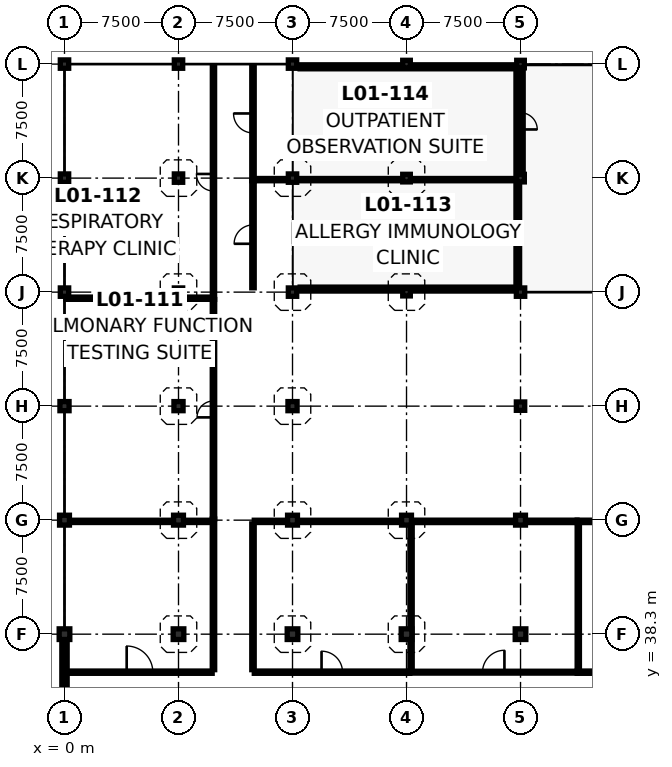
"""IFC4 building model, lengths in metres.
Left out: names, types, materials, properties, quantities, classifications, styles, units other than length and angle.
Written with IfcOpenShell. Run it as: python <this file> out.ifc"""

import sys

from ifc_helpers import new_model, si_unit, direction, frame, frame_2d, origin, origin_2d, place, context, subcontext, project, spatial, rectangle, extrude, element, fill, save


model = new_model("IFC4")
c1 = context("Model", 3, precision=1e-05, world=origin(), true_north=direction((0.0, 1.0)))
c2 = subcontext(c1, "Body", "Model", "MODEL_VIEW")
j1 = project(units=[si_unit("LENGTHUNIT", "METRE"), si_unit("PLANEANGLEUNIT", "RADIAN")], contexts=[c1])
p1 = place(None, origin())
s1 = spatial("IfcSite", under=j1, at=p1, CompositionType="ELEMENT")
p2 = place(p1, origin())
s2 = spatial("IfcBuilding", under=s1, at=p2, CompositionType="ELEMENT")
p3 = place(p2, frame((0.0, 0.0, 5.0)))
s3 = spatial("IfcBuildingStorey", under=s2, at=p3, CompositionType="ELEMENT", Elevation=5.0)
p4 = place(p3, frame((0.0, 38.3, 0.0), z_axis=(0.0, 0.0, 1.0), x_axis=(1.0, 0.0, 0.0)))
e1 = element("IfcColumn", 1, at=p4, inside=s3, PredefinedType="COLUMN", context=c2, shape_type="SweptSolid", body=[
    extrude(rectangle(XDim=0.7, YDim=0.7, at=origin_2d()), origin(), (0.0, 0.0, 1.0), 4.2),
])
p5 = place(p3, frame((0.0, 45.8, 0.0), z_axis=(0.0, 0.0, 1.0), x_axis=(1.0, 0.0, 0.0)))
e2 = element("IfcColumn", 2, at=p5, inside=s3, PredefinedType="COLUMN", context=c2, shape_type="SweptSolid", body=[
    extrude(rectangle(XDim=0.65, YDim=0.65, at=origin_2d()), origin(), (0.0, 0.0, 1.0), 4.2),
])
p6 = place(p3, frame((0.0, 53.3, 0.0), z_axis=(0.0, 0.0, 1.0), x_axis=(1.0, 0.0, 0.0)))
e3 = element("IfcColumn", 3, at=p6, inside=s3, PredefinedType="COLUMN", context=c2, shape_type="SweptSolid", body=[
    extrude(rectangle(XDim=0.6, YDim=0.6, at=origin_2d()), origin(), (0.0, 0.0, 1.0), 4.2),
])
p7 = place(p3, frame((0.0, 60.8, 0.0), z_axis=(0.0, 0.0, 1.0), x_axis=(1.0, 0.0, 0.0)))
e4 = element("IfcColumn", 4, at=p7, inside=s3, PredefinedType="COLUMN", context=c2, shape_type="SweptSolid", body=[
    extrude(rectangle(XDim=0.55, YDim=0.55, at=origin_2d()), origin(), (0.0, 0.0, 1.0), 4.2),
])
for number, where, z_axis, x_axis in (
    (5, (0.0, 68.3, 0.0), (0.0, 0.0, 1.0), (1.0, 0.0, 0.0)),
    (6, (0.0, 75.8, 0.0), (0.0, 0.0, 1.0), (1.0, 0.0, 0.0)),
):
    element("IfcColumn", number, at=place(p3, frame(where, z_axis=z_axis, x_axis=x_axis)), inside=s3, PredefinedType="COLUMN", context=c2, shape_type="SweptSolid", body=[
        extrude(rectangle(XDim=0.55, YDim=0.55, at=origin_2d()), origin(), (0.0, 0.0, 1.0), 4.25),
    ])
p8 = place(p3, frame((7.5, 38.3, 0.0), z_axis=(0.0, 0.0, 1.0), x_axis=(1.0, 0.0, 0.0)))
e7 = element("IfcColumn", 7, at=p8, inside=s3, PredefinedType="COLUMN", context=c2, shape_type="SweptSolid", body=[
    extrude(rectangle(XDim=0.7, YDim=0.7, at=origin_2d()), origin(), (0.0, 0.0, 1.0), 4.2),
])
p9 = place(p3, frame((7.5, 45.8, 0.0), z_axis=(0.0, 0.0, 1.0), x_axis=(1.0, 0.0, 0.0)))
e8 = element("IfcColumn", 8, at=p9, inside=s3, PredefinedType="COLUMN", context=c2, shape_type="SweptSolid", body=[
    extrude(rectangle(XDim=0.65, YDim=0.65, at=origin_2d()), origin(), (0.0, 0.0, 1.0), 4.2),
])
p10 = place(p3, frame((7.5, 53.3, 0.0), z_axis=(0.0, 0.0, 1.0), x_axis=(1.0, 0.0, 0.0)))
e9 = element("IfcColumn", 9, at=p10, inside=s3, PredefinedType="COLUMN", context=c2, shape_type="SweptSolid", body=[
    extrude(rectangle(XDim=0.6, YDim=0.6, at=origin_2d()), origin(), (0.0, 0.0, 1.0), 4.2),
])
p11 = place(p3, frame((7.5, 60.8, 0.0), z_axis=(0.0, 0.0, 1.0), x_axis=(1.0, 0.0, 0.0)))
e10 = element("IfcColumn", 10, at=p11, inside=s3, PredefinedType="COLUMN", context=c2, shape_type="SweptSolid", body=[
    extrude(rectangle(XDim=0.55, YDim=0.55, at=origin_2d()), origin(), (0.0, 0.0, 1.0), 4.2),
])
for number, where, z_axis, x_axis in (
    (11, (7.5, 68.3, 0.0), (0.0, 0.0, 1.0), (1.0, 0.0, 0.0)),
    (12, (7.5, 75.8, 0.0), (0.0, 0.0, 1.0), (1.0, 0.0, 0.0)),
):
    element("IfcColumn", number, at=place(p3, frame(where, z_axis=z_axis, x_axis=x_axis)), inside=s3, PredefinedType="COLUMN", context=c2, shape_type="SweptSolid", body=[
        extrude(rectangle(XDim=0.55, YDim=0.55, at=origin_2d()), origin(), (0.0, 0.0, 1.0), 4.25),
    ])
p12 = place(p3, frame((15.0, 38.3, 0.0), z_axis=(0.0, 0.0, 1.0), x_axis=(1.0, 0.0, 0.0)))
e13 = element("IfcColumn", 13, at=p12, inside=s3, PredefinedType="COLUMN", context=c2, shape_type="SweptSolid", body=[
    extrude(rectangle(XDim=0.7, YDim=0.7, at=origin_2d()), origin(), (0.0, 0.0, 1.0), 4.2),
])
p13 = place(p3, frame((15.0, 45.8, 0.0), z_axis=(0.0, 0.0, 1.0), x_axis=(1.0, 0.0, 0.0)))
e14 = element("IfcColumn", 14, at=p13, inside=s3, PredefinedType="COLUMN", context=c2, shape_type="SweptSolid", body=[
    extrude(rectangle(XDim=0.65, YDim=0.65, at=origin_2d()), origin(), (0.0, 0.0, 1.0), 4.2),
])
p14 = place(p3, frame((15.0, 53.3, 0.0), z_axis=(0.0, 0.0, 1.0), x_axis=(1.0, 0.0, 0.0)))
e15 = element("IfcColumn", 15, at=p14, inside=s3, PredefinedType="COLUMN", context=c2, shape_type="SweptSolid", body=[
    extrude(rectangle(XDim=0.6, YDim=0.6, at=origin_2d()), origin(), (0.0, 0.0, 1.0), 4.2),
])
p15 = place(p3, frame((15.0, 60.8, 0.0), z_axis=(0.0, 0.0, 1.0), x_axis=(1.0, 0.0, 0.0)))
e16 = element("IfcColumn", 16, at=p15, inside=s3, PredefinedType="COLUMN", context=c2, shape_type="SweptSolid", body=[
    extrude(rectangle(XDim=0.55, YDim=0.55, at=origin_2d()), origin(), (0.0, 0.0, 1.0), 4.2),
])
for number, where, z_axis, x_axis in (
    (17, (15.0, 68.3, 0.0), (0.0, 0.0, 1.0), (1.0, 0.0, 0.0)),
    (18, (15.0, 75.8, 0.0), (0.0, 0.0, 1.0), (1.0, 0.0, 0.0)),
):
    element("IfcColumn", number, at=place(p3, frame(where, z_axis=z_axis, x_axis=x_axis)), inside=s3, PredefinedType="COLUMN", context=c2, shape_type="SweptSolid", body=[
        extrude(rectangle(XDim=0.55, YDim=0.55, at=origin_2d()), origin(), (0.0, 0.0, 1.0), 4.25),
    ])
p16 = place(p3, frame((22.5, 38.3, 0.0), z_axis=(0.0, 0.0, 1.0), x_axis=(1.0, 0.0, 0.0)))
e19 = element("IfcColumn", 19, at=p16, inside=s3, PredefinedType="COLUMN", context=c2, shape_type="SweptSolid", body=[
    extrude(rectangle(XDim=0.7, YDim=0.7, at=origin_2d()), origin(), (0.0, 0.0, 1.0), 4.2),
])
p17 = place(p3, frame((22.5, 45.8, 0.0), z_axis=(0.0, 0.0, 1.0), x_axis=(1.0, 0.0, 0.0)))
e20 = element("IfcColumn", 20, at=p17, inside=s3, PredefinedType="COLUMN", context=c2, shape_type="SweptSolid", body=[
    extrude(rectangle(XDim=0.65, YDim=0.65, at=origin_2d()), origin(), (0.0, 0.0, 1.0), 4.2),
])
for number, where, z_axis, x_axis in (
    (21, (22.5, 60.8, 0.0), (0.0, 0.0, 1.0), (1.0, 0.0, 0.0)),
    (22, (22.5, 68.3, 0.0), (0.0, 0.0, 1.0), (1.0, 0.0, 0.0)),
    (23, (22.5, 75.8, 0.0), (0.0, 0.0, 1.0), (1.0, 0.0, 0.0)),
):
    element("IfcColumn", number, at=place(p3, frame(where, z_axis=z_axis, x_axis=x_axis)), inside=s3, PredefinedType="COLUMN", context=c2, shape_type="SweptSolid", body=[
        extrude(rectangle(XDim=0.5, YDim=0.5, at=origin_2d()), origin(), (0.0, 0.0, 1.0), 4.2),
    ])
p18 = place(p3, frame((30.0, 38.3, 0.0), z_axis=(0.0, 0.0, 1.0), x_axis=(1.0, 0.0, 0.0)))
e24 = element("IfcColumn", 24, at=p18, inside=s3, PredefinedType="COLUMN", context=c2, shape_type="SweptSolid", body=[
    extrude(rectangle(XDim=0.7, YDim=0.7, at=origin_2d()), origin(), (0.0, 0.0, 1.0), 4.2),
])
p19 = place(p3, frame((30.0, 45.8, 0.0), z_axis=(0.0, 0.0, 1.0), x_axis=(1.0, 0.0, 0.0)))
e25 = element("IfcColumn", 25, at=p19, inside=s3, PredefinedType="COLUMN", context=c2, shape_type="SweptSolid", body=[
    extrude(rectangle(XDim=0.65, YDim=0.65, at=origin_2d()), origin(), (0.0, 0.0, 1.0), 4.2),
])
for number, where, z_axis, x_axis in (
    (26, (30.0, 53.3, 0.0), (0.0, 0.0, 1.0), (1.0, 0.0, 0.0)),
    (27, (30.0, 60.8, 0.0), (0.0, 0.0, 1.0), (1.0, 0.0, 0.0)),
):
    element("IfcColumn", number, at=place(p3, frame(where, z_axis=z_axis, x_axis=x_axis)), inside=s3, PredefinedType="COLUMN", context=c2, shape_type="SweptSolid", body=[
        extrude(rectangle(XDim=0.55, YDim=0.55, at=origin_2d()), origin(), (0.0, 0.0, 1.0), 4.2),
    ])
for number, where, z_axis, x_axis in (
    (28, (30.0, 68.3, 0.0), (0.0, 0.0, 1.0), (1.0, 0.0, 0.0)),
    (29, (30.0, 75.8, 0.0), (0.0, 0.0, 1.0), (1.0, 0.0, 0.0)),
):
    element("IfcColumn", number, at=place(p3, frame(where, z_axis=z_axis, x_axis=x_axis)), inside=s3, PredefinedType="COLUMN", context=c2, shape_type="SweptSolid", body=[
        extrude(rectangle(XDim=0.5, YDim=0.5, at=origin_2d()), origin(), (0.0, 0.0, 1.0), 4.2),
    ])
p20 = place(p3, frame((0.0, 31.15, 0.0), z_axis=(0.0, 0.0, 1.0), x_axis=(0.0, 1.0, 0.0)))
e30 = element("IfcWall", 30, at=p20, inside=s3, PredefinedType="SOLIDWALL", context=c2, shape_type="SweptSolid", body=[
    extrude(rectangle(XDim=6.8, YDim=0.35, at=frame_2d((3.4, 0.0))), origin(), (0.0, 0.0, 1.0), 3.535),
])
p21 = place(p3, frame((30.0, 75.55, 0.0), z_axis=(0.0, 0.0, 1.0), x_axis=(0.0, -1.0, 0.0)))
e31 = element("IfcWall", 31, at=p21, inside=s3, PredefinedType="SOLIDWALL", context=c2, shape_type="SweptSolid", body=[
    extrude(rectangle(XDim=7.0, YDim=0.35, at=frame_2d((3.5, 0.0))), origin(), (0.0, 0.0, 1.0), 4.2),
])
p22 = place(p21, frame((2.95, 0.0, 0.0)))
e32 = element("IfcOpeningElement", 32, at=p22, cuts=e31, PredefinedType="OPENING", context=c2, shape_type="SweptSolid", body=[
    extrude(rectangle(XDim=1.1, YDim=2.15, at=frame_2d((0.55, 1.075))), frame((0.0, 0.187, 0.0), z_axis=(0.0, -1.0, 0.0), x_axis=(1.0, 0.0, 0.0)), (0.0, 0.0, 1.0), 0.374),
])
p23 = place(p3, frame((15.5, 75.62, 4.4), z_axis=(0.0, 0.0, 1.0), x_axis=(1.0, 0.0, 0.0)))
e33 = element("IfcWall", 33, at=p23, inside=s3, PredefinedType="PARAPET", context=c2, shape_type="SweptSolid", body=[
    extrude(rectangle(XDim=14.02, YDim=0.26, at=frame_2d((7.01, 0.0))), origin(), (0.0, 0.0, 1.0), 0.6),
])
p24 = place(p3, frame((29.82, 75.32, 4.4), z_axis=(0.0, 0.0, 1.0), x_axis=(0.0, -1.0, 0.0)))
e34 = element("IfcWall", 34, at=p24, inside=s3, PredefinedType="PARAPET", context=c2, shape_type="SweptSolid", body=[
    extrude(rectangle(XDim=14.02, YDim=0.24, at=frame_2d((7.01, 0.0))), origin(), (0.0, 0.0, 1.0), 0.6),
])
p25 = place(p3, frame((29.52, 61.0, 4.4), z_axis=(0.0, 0.0, 1.0), x_axis=(-1.0, 0.0, 0.0)))
e35 = element("IfcWall", 35, at=p25, inside=s3, PredefinedType="PARAPET", context=c2, shape_type="SweptSolid", body=[
    extrude(rectangle(XDim=14.02, YDim=0.26, at=frame_2d((7.01, 0.0))), origin(), (0.0, 0.0, 1.0), 0.6),
])
p26 = place(p3, frame((0.187, 35.8, 0.0), z_axis=(0.0, 0.0, 1.0), x_axis=(1.0, 0.0, 0.0)))
e36 = element("IfcWall", 36, at=p26, inside=s3, PredefinedType="PARTITIONING", context=c2, shape_type="SweptSolid", body=[
    extrude(rectangle(XDim=9.528, YDim=0.15, at=frame_2d((4.764, 0.0))), origin(), (0.0, 0.0, 1.0), 3.265),
])
p27 = place(p26, frame((3.904, 0.0, 0.0)))
e37 = element("IfcOpeningElement", 37, at=p27, cuts=e36, PredefinedType="OPENING", context=c2, shape_type="SweptSolid", body=[
    extrude(rectangle(XDim=1.72, YDim=2.34, at=frame_2d((0.86, 1.17))), frame((0.0, 0.087, 0.0), z_axis=(0.0, -1.0, 0.0), x_axis=(1.0, 0.0, 0.0)), (0.0, 0.0, 1.0), 0.174),
])
p28 = place(p3, frame((12.485, 35.8, 0.0), z_axis=(0.0, 0.0, 1.0), x_axis=(1.0, 0.0, 0.0)))
e38 = element("IfcWall", 38, at=p28, inside=s3, PredefinedType="PARTITIONING", context=c2, shape_type="SweptSolid", body=[
    extrude(rectangle(XDim=10.23, YDim=0.15, at=frame_2d((5.115, 0.0))), origin(), (0.0, 0.0, 1.0), 3.265),
])
p29 = place(p28, frame((4.425, 0.0, 0.0)))
e39 = element("IfcOpeningElement", 39, at=p29, cuts=e38, PredefinedType="OPENING", context=c2, shape_type="SweptSolid", body=[
    extrude(rectangle(XDim=1.38, YDim=2.3, at=frame_2d((0.69, 1.15))), frame((0.0, 0.087, 0.0), z_axis=(0.0, -1.0, 0.0), x_axis=(1.0, 0.0, 0.0)), (0.0, 0.0, 1.0), 0.174),
])
p30 = place(p3, frame((22.727, 35.8, 0.0), z_axis=(0.0, 0.0, 1.0), x_axis=(1.0, 0.0, 0.0)))
e40 = element("IfcWall", 40, at=p30, inside=s3, PredefinedType="PARTITIONING", context=c2, shape_type="SweptSolid", body=[
    extrude(rectangle(XDim=10.988, YDim=0.125, at=frame_2d((5.494, 0.0))), origin(), (0.0, 0.0, 1.0), 3.265),
])
p31 = place(p30, frame((4.774, 0.0, 0.0)))
e41 = element("IfcOpeningElement", 41, at=p31, cuts=e40, PredefinedType="OPENING", context=c2, shape_type="SweptSolid", body=[
    extrude(rectangle(XDim=1.44, YDim=2.32, at=frame_2d((0.72, 1.16))), frame((0.0, 0.074, 0.0), z_axis=(0.0, -1.0, 0.0), x_axis=(1.0, 0.0, 0.0)), (0.0, 0.0, 1.0), 0.149),
])
p32 = place(p3, frame((33.727, 35.8, 0.0), z_axis=(0.0, 0.0, 1.0), x_axis=(1.0, 0.0, 0.0)))
e42 = element("IfcWall", 42, at=p32, inside=s3, PredefinedType="PARTITIONING", context=c2, shape_type="SweptSolid", body=[
    extrude(rectangle(XDim=11.171, YDim=0.15, at=frame_2d((5.585, 0.0))), origin(), (0.0, 0.0, 1.0), 3.485),
])
p33 = place(p32, frame((5.085, 0.0, 0.0)))
e43 = element("IfcOpeningElement", 43, at=p33, cuts=e42, PredefinedType="OPENING", context=c2, shape_type="SweptSolid", body=[
    extrude(rectangle(XDim=1.0, YDim=2.15, at=frame_2d((0.5, 1.075))), frame((0.0, 0.087, 0.0), z_axis=(0.0, -1.0, 0.0), x_axis=(1.0, 0.0, 0.0)), (0.0, 0.0, 1.0), 0.174),
])
p34 = place(p3, frame((9.8, 45.885, 0.0), z_axis=(0.0, 0.0, 1.0), x_axis=(0.0, 1.0, 0.0)))
e44 = element("IfcWall", 44, at=p34, inside=s3, PredefinedType="PARTITIONING", context=c2, shape_type="SweptSolid", body=[
    extrude(rectangle(XDim=14.43, YDim=0.16, at=frame_2d((7.215, 0.0))), origin(), (0.0, 0.0, 1.0), 3.265),
])
p35 = place(p34, frame((6.675, 0.0, 0.0)))
e45 = element("IfcOpeningElement", 45, at=p35, cuts=e44, PredefinedType="OPENING", context=c2, shape_type="SweptSolid", body=[
    extrude(rectangle(XDim=1.08, YDim=2.18, at=frame_2d((0.54, 1.09))), frame((0.0, 0.092, 0.0), z_axis=(0.0, -1.0, 0.0), x_axis=(1.0, 0.0, 0.0)), (0.0, 0.0, 1.0), 0.184),
])
p36 = place(p3, frame((9.8, 60.327, 0.0), z_axis=(0.0, 0.0, 1.0), x_axis=(0.0, 1.0, 0.0)))
e46 = element("IfcWall", 46, at=p36, inside=s3, PredefinedType="PARTITIONING", context=c2, shape_type="SweptSolid", body=[
    extrude(rectangle(XDim=15.371, YDim=0.15, at=frame_2d((7.686, 0.0))), origin(), (0.0, 0.0, 1.0), 3.265),
])
p37 = place(p36, frame((7.125, 0.0, 0.0)))
e47 = element("IfcOpeningElement", 47, at=p37, cuts=e46, PredefinedType="OPENING", context=c2, shape_type="SweptSolid", body=[
    extrude(rectangle(XDim=1.12, YDim=2.2, at=frame_2d((0.56, 1.1))), frame((0.0, 0.087, 0.0), z_axis=(0.0, -1.0, 0.0), x_axis=(1.0, 0.0, 0.0)), (0.0, 0.0, 1.0), 0.174),
])
p38 = place(p3, frame((12.4, 61.085, 0.0), z_axis=(0.0, 0.0, 1.0), x_axis=(0.0, 1.0, 0.0)))
e48 = element("IfcWall", 48, at=p38, inside=s3, PredefinedType="PARTITIONING", context=c2, shape_type="SweptSolid", body=[
    extrude(rectangle(XDim=7.03, YDim=0.16, at=frame_2d((3.515, 0.0))), origin(), (0.0, 0.0, 1.0), 3.265),
])
p39 = place(p38, frame((2.895, 0.0, 0.0)))
e49 = element("IfcOpeningElement", 49, at=p39, cuts=e48, PredefinedType="OPENING", context=c2, shape_type="SweptSolid", body=[
    extrude(rectangle(XDim=1.24, YDim=2.2, at=frame_2d((0.62, 1.1))), frame((0.0, 0.092, 0.0), z_axis=(0.0, -1.0, 0.0), x_axis=(1.0, 0.0, 0.0)), (0.0, 0.0, 1.0), 0.184),
])
p40 = place(p3, frame((12.4, 68.127, 0.0), z_axis=(0.0, 0.0, 1.0), x_axis=(0.0, 1.0, 0.0)))
e50 = element("IfcWall", 50, at=p40, inside=s3, PredefinedType="PARTITIONING", context=c2, shape_type="SweptSolid", body=[
    extrude(rectangle(XDim=7.571, YDim=0.16, at=frame_2d((3.786, 0.0))), origin(), (0.0, 0.0, 1.0), 3.315),
])
p41 = place(p40, frame((3.146, 0.0, 0.0)))
e51 = element("IfcOpeningElement", 51, at=p41, cuts=e50, PredefinedType="OPENING", context=c2, shape_type="SweptSolid", body=[
    extrude(rectangle(XDim=1.28, YDim=2.22, at=frame_2d((0.64, 1.11))), frame((0.0, 0.092, 0.0), z_axis=(0.0, -1.0, 0.0), x_axis=(1.0, 0.0, 0.0)), (0.0, 0.0, 1.0), 0.184),
])
p42 = place(p3, frame((0.332, 45.72, 0.0), z_axis=(0.0, 0.0, 1.0), x_axis=(1.0, 0.0, 0.0)))
e52 = element("IfcWall", 52, at=p42, inside=s3, PredefinedType="PARTITIONING", context=c2, shape_type="SweptSolid", body=[
    extrude(rectangle(XDim=9.383, YDim=0.15, at=frame_2d((4.691, 0.0))), origin(), (0.0, 0.0, 1.0), 3.265),
])
p43 = place(p3, frame((12.485, 45.72, 0.0), z_axis=(0.0, 0.0, 1.0), x_axis=(1.0, 0.0, 0.0)))
e53 = element("IfcWall", 53, at=p43, inside=s3, PredefinedType="PARTITIONING", context=c2, shape_type="SweptSolid", body=[
    extrude(rectangle(XDim=10.063, YDim=0.15, at=frame_2d((5.031, 0.0))), origin(), (0.0, 0.0, 1.0), 3.265),
])
p44 = place(p3, frame((22.837, 45.72, 0.0), z_axis=(0.0, 0.0, 1.0), x_axis=(1.0, 0.0, 0.0)))
e54 = element("IfcWall", 54, at=p44, inside=s3, PredefinedType="PARTITIONING", context=c2, shape_type="SweptSolid", body=[
    extrude(rectangle(XDim=10.878, YDim=0.16, at=frame_2d((5.439, 0.0))), origin(), (0.0, 0.0, 1.0), 3.265),
])
p45 = place(p3, frame((33.727, 45.72, 0.0), z_axis=(0.0, 0.0, 1.0), x_axis=(1.0, 0.0, 0.0)))
e55 = element("IfcWall", 55, at=p45, inside=s3, PredefinedType="PARTITIONING", context=c2, shape_type="SweptSolid", body=[
    extrude(rectangle(XDim=10.961, YDim=0.16, at=frame_2d((5.48, 0.0))), origin(), (0.0, 0.0, 1.0), 3.485),
])
p46 = place(p3, frame((9.8, 35.965, 0.0), z_axis=(0.0, 0.0, 1.0), x_axis=(0.0, 1.0, 0.0)))
e56 = element("IfcWall", 56, at=p46, inside=s3, PredefinedType="PARTITIONING", context=c2, shape_type="SweptSolid", body=[
    extrude(rectangle(XDim=9.908, YDim=0.16, at=frame_2d((4.954, 0.0))), origin(), (0.0, 0.0, 1.0), 3.265),
])
p47 = place(p3, frame((12.4, 35.965, 0.0), z_axis=(0.0, 0.0, 1.0), x_axis=(0.0, 1.0, 0.0)))
e57 = element("IfcWall", 57, at=p47, inside=s3, PredefinedType="PARTITIONING", context=c2, shape_type="SweptSolid", body=[
    extrude(rectangle(XDim=9.59, YDim=0.16, at=frame_2d((4.795, 0.0))), origin(), (0.0, 0.0, 1.0), 3.265),
])
p48 = place(p3, frame((22.8, 35.875, 0.0), z_axis=(0.0, 0.0, 1.0), x_axis=(0.0, 1.0, 0.0)))
e58 = element("IfcWall", 58, at=p48, inside=s3, PredefinedType="PARTITIONING", context=c2, shape_type="SweptSolid", body=[
    extrude(rectangle(XDim=9.588, YDim=0.15, at=frame_2d((4.794, 0.0))), origin(), (0.0, 0.0, 1.0), 3.265),
])
p49 = place(p3, frame((33.8, 35.887, 0.0), z_axis=(0.0, 0.0, 1.0), x_axis=(0.0, 1.0, 0.0)))
e59 = element("IfcWall", 59, at=p49, inside=s3, PredefinedType="PARTITIONING", context=c2, shape_type="SweptSolid", body=[
    extrude(rectangle(XDim=9.741, YDim=0.15, at=frame_2d((4.871, 0.0))), origin(), (0.0, 0.0, 1.0), 3.485),
])
p50 = place(p3, frame((0.102, 60.4, 0.0), z_axis=(0.0, 0.0, 1.0), x_axis=(1.0, 0.0, 0.0)))
e60 = element("IfcWall", 60, at=p50, inside=s3, PredefinedType="PARTITIONING", context=c2, shape_type="SweptSolid", body=[
    extrude(rectangle(XDim=9.611, YDim=0.15, at=frame_2d((4.805, 0.0))), origin(), (0.0, 0.0, 1.0), 3.265),
])
p51 = place(p3, frame((12.492, 68.2, 0.0), z_axis=(0.0, 0.0, 1.0), x_axis=(1.0, 0.0, 0.0)))
e61 = element("IfcWall", 61, at=p51, inside=s3, PredefinedType="PARTITIONING", context=c2, shape_type="SweptSolid", body=[
    extrude(rectangle(XDim=17.196, YDim=0.15, at=frame_2d((8.598, 0.0))), origin(), (0.0, 0.0, 1.0), 3.315),
])
p52 = place(p22, origin())
e62 = element("IfcDoor", 62, at=p52, inside=s3, OperationType="SINGLE_SWING_RIGHT", PredefinedType="DOOR", context=c2, shape_type="SweptSolid", body=[
    extrude(rectangle(XDim=1.1, YDim=2.15, at=frame_2d((0.55, 1.075))), frame((0.0, 0.025, 0.0), z_axis=(0.0, -1.0, 0.0), x_axis=(1.0, 0.0, 0.0)), (0.0, 0.0, 1.0), 0.05),
])
fill(e32, e62)
p53 = place(p27, origin())
e63 = element("IfcDoor", 63, at=p53, inside=s3, OperationType="SINGLE_SWING_LEFT", PredefinedType="DOOR", context=c2, shape_type="SweptSolid", body=[
    extrude(rectangle(XDim=1.72, YDim=2.34, at=frame_2d((0.86, 1.17))), frame((0.0, 0.025, 0.0), z_axis=(0.0, -1.0, 0.0), x_axis=(1.0, 0.0, 0.0)), (0.0, 0.0, 1.0), 0.05),
])
fill(e37, e63)
p54 = place(p29, origin())
e64 = element("IfcDoor", 64, at=p54, inside=s3, OperationType="SINGLE_SWING_LEFT", PredefinedType="DOOR", context=c2, shape_type="SweptSolid", body=[
    extrude(rectangle(XDim=1.38, YDim=2.3, at=frame_2d((0.69, 1.15))), frame((0.0, 0.025, 0.0), z_axis=(0.0, -1.0, 0.0), x_axis=(1.0, 0.0, 0.0)), (0.0, 0.0, 1.0), 0.05),
])
fill(e39, e64)
p55 = place(p31, origin())
e65 = element("IfcDoor", 65, at=p55, inside=s3, OperationType="SINGLE_SWING_RIGHT", PredefinedType="DOOR", context=c2, shape_type="SweptSolid", body=[
    extrude(rectangle(XDim=1.44, YDim=2.32, at=frame_2d((0.72, 1.16))), frame((0.0, 0.025, 0.0), z_axis=(0.0, -1.0, 0.0), x_axis=(1.0, 0.0, 0.0)), (0.0, 0.0, 1.0), 0.05),
])
fill(e41, e65)
p56 = place(p35, origin())
e66 = element("IfcDoor", 66, at=p56, inside=s3, OperationType="SINGLE_SWING_LEFT", PredefinedType="DOOR", context=c2, shape_type="SweptSolid", body=[
    extrude(rectangle(XDim=1.08, YDim=2.18, at=frame_2d((0.54, 1.09))), frame((0.0, 0.025, 0.0), z_axis=(0.0, -1.0, 0.0), x_axis=(1.0, 0.0, 0.0)), (0.0, 0.0, 1.0), 0.05),
])
fill(e45, e66)
p57 = place(p37, origin())
e67 = element("IfcDoor", 67, at=p57, inside=s3, OperationType="SINGLE_SWING_RIGHT", PredefinedType="DOOR", context=c2, shape_type="SweptSolid", body=[
    extrude(rectangle(XDim=1.12, YDim=2.2, at=frame_2d((0.56, 1.1))), frame((0.0, 0.025, 0.0), z_axis=(0.0, -1.0, 0.0), x_axis=(1.0, 0.0, 0.0)), (0.0, 0.0, 1.0), 0.05),
])
fill(e47, e67)
p58 = place(p39, origin())
e68 = element("IfcDoor", 68, at=p58, inside=s3, OperationType="SINGLE_SWING_LEFT", PredefinedType="DOOR", context=c2, shape_type="SweptSolid", body=[
    extrude(rectangle(XDim=1.24, YDim=2.2, at=frame_2d((0.62, 1.1))), frame((0.0, 0.025, 0.0), z_axis=(0.0, -1.0, 0.0), x_axis=(1.0, 0.0, 0.0)), (0.0, 0.0, 1.0), 0.05),
])
fill(e49, e68)
p59 = place(p41, origin())
e69 = element("IfcDoor", 69, at=p59, inside=s3, OperationType="SINGLE_SWING_RIGHT", PredefinedType="DOOR", context=c2, shape_type="SweptSolid", body=[
    extrude(rectangle(XDim=1.28, YDim=2.22, at=frame_2d((0.64, 1.11))), frame((0.0, 0.025, 0.0), z_axis=(0.0, -1.0, 0.0), x_axis=(1.0, 0.0, 0.0)), (0.0, 0.0, 1.0), 0.05),
])
fill(e51, e69)
save(model, sys.argv[1])
